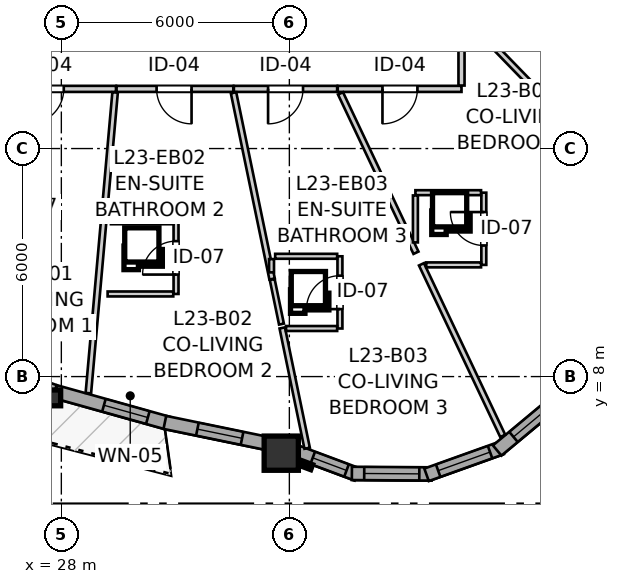
"""IFC4 building model, lengths in metres.
Left out: names, types, materials, properties, quantities, classifications, styles, units other than length and angle.
Written with IfcOpenShell. Run it as: python <this file> out.ifc"""

import sys

from ifc_helpers import new_model, si_unit, direction, frame, frame_2d, origin, origin_2d, place, context, subcontext, project, spatial, rectangle, i_section, extrude, source, transform, mapped, element, fill, save


model = new_model("IFC4")
c1 = context("Model", 3, precision=1e-05, world=origin(), true_north=direction((0.0, 1.0)))
c2 = subcontext(c1, "Body", "Model", "MODEL_VIEW")
j1 = project(units=[si_unit("LENGTHUNIT", "METRE"), si_unit("PLANEANGLEUNIT", "RADIAN")], contexts=[c1])
p1 = place(None, origin())
s1 = spatial("IfcSite", under=j1, at=p1, CompositionType="ELEMENT")
p2 = place(p1, origin())
s2 = spatial("IfcBuilding", under=s1, at=p2, CompositionType="ELEMENT")
p3 = place(p2, frame((0.0, 0.0, 80.0)))
s3 = spatial("IfcBuildingStorey", under=s2, at=p3, CompositionType="ELEMENT", Elevation=80.0)
m1 = source(origin(), c2, "Body", "SweptSolid", [
    extrude(i_section(OverallWidth=0.406, OverallDepth=0.416, WebThickness=0.027, FlangeThickness=0.044, FilletRadius=0.015, at=origin_2d()), origin(), (0.0, 0.0, 1.0), 2.935),
])
p4 = place(p3, frame((27.779, 7.439, 0.0), z_axis=(0.0, 0.0, 1.0), x_axis=(1.0, 0.0, 0.0)))
e1 = element("IfcColumn", 1, at=p4, inside=s3, PredefinedType="PILASTER", context=c2, shape_type="MappedRepresentation", body=[
    mapped(m1, transform((0.0, 0.0, 0.0), x_axis=(1.0, 0.0, 0.0), y_axis=(0.0, 1.0, 0.0), z_axis=(0.0, 0.0, 1.0), scale=1.0)),
])
m2 = source(origin(), c2, "Body", "SweptSolid", [
    extrude(rectangle(XDim=0.9, YDim=0.9, at=origin_2d()), origin(), (0.0, 0.0, 1.0), 2.935),
])
p5 = place(p3, frame((33.787, 5.985, 0.0), z_axis=(0.0, 0.0, 1.0), x_axis=(1.0, 0.0, 0.0)))
e2 = element("IfcColumn", 2, at=p5, inside=s3, PredefinedType="COLUMN", context=c2, shape_type="MappedRepresentation", body=[
    mapped(m2, transform((0.0, 0.0, 0.0), x_axis=(1.0, 0.0, 0.0), y_axis=(0.0, 1.0, 0.0), z_axis=(0.0, 0.0, 1.0), scale=1.0)),
])
p6 = place(p3, frame((24.969, 8.635, 0.0), z_axis=(0.0, 0.0, 1.0), x_axis=(0.941099972293, -0.338128440315, 0.0)))
e3 = element("IfcWall", 3, at=p6, inside=s3, PredefinedType="SOLIDWALL", context=c2, shape_type="SweptSolid", body=[
    extrude(rectangle(XDim=3.028, YDim=0.35, at=frame_2d((1.514, 0.0))), origin(), (0.0, 0.0, 1.0), 2.465),
])
p7 = place(p6, frame((0.774, 0.0, 0.82)))
e4 = element("IfcOpeningElement", 4, at=p7, cuts=e3, PredefinedType="OPENING", context=c2, shape_type="SweptSolid", body=[
    extrude(rectangle(XDim=1.5, YDim=1.45, at=frame_2d((0.75, 0.725))), frame((0.0, 0.185, 0.0), z_axis=(0.0, -1.0, 0.0), x_axis=(1.0, 0.0, 0.0)), (0.0, 0.0, 1.0), 0.37),
])
p8 = place(p3, frame((27.845, 7.603, 0.0), z_axis=(0.0, 0.0, 1.0), x_axis=(0.963041412051, -0.269353371382, 0.0)))
e5 = element("IfcWall", 5, at=p8, inside=s3, PredefinedType="SOLIDWALL", context=c2, shape_type="SweptSolid", body=[
    extrude(rectangle(XDim=3.078, YDim=0.35, at=frame_2d((1.539, 0.0))), origin(), (0.0, 0.0, 1.0), 2.465),
])
p9 = place(p8, frame((1.324, 0.0, 0.82)))
e6 = element("IfcOpeningElement", 6, at=p9, cuts=e5, PredefinedType="OPENING", context=c2, shape_type="SweptSolid", body=[
    extrude(rectangle(XDim=1.2, YDim=1.45, at=frame_2d((0.6, 0.725))), frame((0.0, 0.185, 0.0), z_axis=(0.0, -1.0, 0.0), x_axis=(1.0, 0.0, 0.0)), (0.0, 0.0, 1.0), 0.37),
])
p10 = place(p3, frame((30.724, 6.794, 0.0), z_axis=(0.0, 0.0, 1.0), x_axis=(0.979439663571, -0.201737317878, 0.0)))
e7 = element("IfcWall", 7, at=p10, inside=s3, PredefinedType="SOLIDWALL", context=c2, shape_type="SweptSolid", body=[
    extrude(rectangle(XDim=2.938, YDim=0.35, at=frame_2d((1.469, 0.0))), origin(), (0.0, 0.0, 1.0), 2.465),
])
p11 = place(p10, frame((0.874, 0.0, 0.82)))
e8 = element("IfcOpeningElement", 8, at=p11, cuts=e7, PredefinedType="OPENING", context=c2, shape_type="SweptSolid", body=[
    extrude(rectangle(XDim=1.2, YDim=1.45, at=frame_2d((0.6, 0.725))), frame((0.0, 0.185, 0.0), z_axis=(0.0, -1.0, 0.0), x_axis=(1.0, 0.0, 0.0)), (0.0, 0.0, 1.0), 0.37),
])
p12 = place(p3, frame((34.059, 6.07, 0.0), z_axis=(0.0, 0.0, 1.0), x_axis=(0.936803747811, -0.349855310219, 0.0)))
e9 = element("IfcWall", 9, at=p12, inside=s3, PredefinedType="SOLIDWALL", context=c2, shape_type="SweptSolid", body=[
    extrude(rectangle(XDim=1.836, YDim=0.35, at=frame_2d((0.918, 0.0))), origin(), (0.0, 0.0, 1.0), 2.465),
])
p13 = place(p12, frame((0.593, 0.0, 0.82)))
e10 = element("IfcOpeningElement", 10, at=p13, cuts=e9, PredefinedType="OPENING", context=c2, shape_type="SweptSolid", body=[
    extrude(rectangle(XDim=0.95, YDim=1.35, at=frame_2d((0.475, 0.675))), frame((0.0, 0.185, 0.0), z_axis=(0.0, -1.0, 0.0), x_axis=(1.0, 0.0, 0.0)), (0.0, 0.0, 1.0), 0.37),
])
p14 = place(p3, frame((35.646, 5.452, 0.0), z_axis=(0.0, 0.0, 1.0), x_axis=(0.999976451414, -0.006862697526, 0.0)))
e11 = element("IfcWall", 11, at=p14, inside=s3, PredefinedType="SOLIDWALL", context=c2, shape_type="SweptSolid", body=[
    extrude(rectangle(XDim=2.099, YDim=0.35, at=frame_2d((1.049, 0.0))), origin(), (0.0, 0.0, 1.0), 2.465),
])
p15 = place(p14, frame((0.324, 0.0, 0.82)))
e12 = element("IfcOpeningElement", 12, at=p15, cuts=e11, PredefinedType="OPENING", context=c2, shape_type="SweptSolid", body=[
    extrude(rectangle(XDim=1.45, YDim=1.25, at=frame_2d((0.725, 0.625))), frame((0.0, 0.185, 0.0), z_axis=(0.0, -1.0, 0.0), x_axis=(1.0, 0.0, 0.0)), (0.0, 0.0, 1.0), 0.37),
])
p16 = place(p3, frame((37.61, 5.415, 0.0), z_axis=(0.0, 0.0, 1.0), x_axis=(0.941473186867, 0.33708787936, 0.0)))
e13 = element("IfcWall", 13, at=p16, inside=s3, PredefinedType="SOLIDWALL", context=c2, shape_type="SweptSolid", body=[
    extrude(rectangle(XDim=2.099, YDim=0.35, at=frame_2d((1.049, 0.0))), origin(), (0.0, 0.0, 1.0), 2.465),
])
p17 = place(p16, frame((0.324, 0.0, 0.82)))
e14 = element("IfcOpeningElement", 14, at=p17, cuts=e13, PredefinedType="OPENING", context=c2, shape_type="SweptSolid", body=[
    extrude(rectangle(XDim=1.45, YDim=1.25, at=frame_2d((0.725, 0.625))), frame((0.0, 0.185, 0.0), z_axis=(0.0, -1.0, 0.0), x_axis=(1.0, 0.0, 0.0)), (0.0, 0.0, 1.0), 0.37),
])
p18 = place(p3, frame((39.469, 6.055, 0.0), z_axis=(0.0, 0.0, 1.0), x_axis=(0.768497696041, 0.639852554249, 0.0)))
e15 = element("IfcWall", 15, at=p18, inside=s3, PredefinedType="SOLIDWALL", context=c2, shape_type="SweptSolid", body=[
    extrude(rectangle(XDim=2.099, YDim=0.35, at=frame_2d((1.049, 0.0))), origin(), (0.0, 0.0, 1.0), 2.465),
])
p19 = place(p18, frame((0.559, 0.0, 0.82)))
e16 = element("IfcOpeningElement", 16, at=p19, cuts=e15, PredefinedType="OPENING", context=c2, shape_type="SweptSolid", body=[
    extrude(rectangle(XDim=1.25, YDim=1.35, at=frame_2d((0.625, 0.675))), frame((0.0, 0.185, 0.0), z_axis=(0.0, -1.0, 0.0), x_axis=(1.0, 0.0, 0.0)), (0.0, 0.0, 1.0), 0.37),
])
p20 = place(p3, frame((29.438, 15.57, 0.0), z_axis=(0.0, 0.0, 1.0), x_axis=(-1.0, 0.0, 0.0)))
e17 = element("IfcWall", 17, at=p20, inside=s3, PredefinedType="PARTITIONING", context=c2, shape_type="SweptSolid", body=[
    extrude(rectangle(XDim=3.67, YDim=0.16, at=frame_2d((1.835, 0.0))), origin(), (0.0, 0.0, 1.0), 2.935),
])
p21 = place(p20, frame((1.374, 0.0, 0.0)))
e18 = element("IfcOpeningElement", 18, at=p21, cuts=e17, PredefinedType="OPENING", context=c2, shape_type="SweptSolid", body=[
    extrude(rectangle(XDim=0.92, YDim=2.1, at=frame_2d((0.46, 1.05))), frame((0.0, 0.09, 0.0), z_axis=(0.0, -1.0, 0.0), x_axis=(1.0, 0.0, 0.0)), (0.0, 0.0, 1.0), 0.18),
])
p22 = place(p3, frame((38.53, 15.57, 0.0), z_axis=(0.0, 0.0, 1.0), x_axis=(-1.0, 0.0, 0.0)))
e19 = element("IfcWall", 19, at=p22, inside=s3, PredefinedType="PARTITIONING", context=c2, shape_type="SweptSolid", body=[
    extrude(rectangle(XDim=3.257, YDim=0.16, at=frame_2d((1.628, 0.0))), origin(), (0.0, 0.0, 1.0), 2.935),
])
p23 = place(p22, frame((1.16, 0.0, 0.0)))
e20 = element("IfcOpeningElement", 20, at=p23, cuts=e19, PredefinedType="OPENING", context=c2, shape_type="SweptSolid", body=[
    extrude(rectangle(XDim=0.92, YDim=2.1, at=frame_2d((0.46, 1.05))), frame((0.0, 0.09, 0.0), z_axis=(0.0, -1.0, 0.0), x_axis=(1.0, 0.0, 0.0)), (0.0, 0.0, 1.0), 0.18),
])
p24 = place(p3, frame((32.525, 15.57, 0.0), z_axis=(0.0, 0.0, 1.0), x_axis=(-1.0, 0.0, 0.0)))
e21 = element("IfcWall", 21, at=p24, inside=s3, PredefinedType="PARTITIONING", context=c2, shape_type="SweptSolid", body=[
    extrude(rectangle(XDim=3.072, YDim=0.16, at=frame_2d((1.536, 0.0))), origin(), (0.0, 0.0, 1.0), 2.935),
])
p25 = place(p24, frame((1.098, 0.0, 0.0)))
e22 = element("IfcOpeningElement", 22, at=p25, cuts=e21, PredefinedType="OPENING", context=c2, shape_type="SweptSolid", body=[
    extrude(rectangle(XDim=0.92, YDim=2.1, at=frame_2d((0.46, 1.05))), frame((0.0, 0.09, 0.0), z_axis=(0.0, -1.0, 0.0), x_axis=(1.0, 0.0, 0.0)), (0.0, 0.0, 1.0), 0.18),
])
p26 = place(p3, frame((35.258, 15.57, 0.0), z_axis=(0.0, 0.0, 1.0), x_axis=(-1.0, 0.0, 0.0)))
e23 = element("IfcWall", 23, at=p26, inside=s3, PredefinedType="PARTITIONING", context=c2, shape_type="SweptSolid", body=[
    extrude(rectangle(XDim=2.718, YDim=0.16, at=frame_2d((1.359, 0.0))), origin(), (0.0, 0.0, 1.0), 2.935),
])
p27 = place(p26, frame((0.898, 0.0, 0.0)))
e24 = element("IfcOpeningElement", 24, at=p27, cuts=e23, PredefinedType="OPENING", context=c2, shape_type="SweptSolid", body=[
    extrude(rectangle(XDim=0.92, YDim=2.1, at=frame_2d((0.46, 1.05))), frame((0.0, 0.09, 0.0), z_axis=(0.0, -1.0, 0.0), x_axis=(1.0, 0.0, 0.0)), (0.0, 0.0, 1.0), 0.18),
])
p28 = place(p3, frame((31.018, 10.174, 0.0), z_axis=(0.0, 0.0, 1.0), x_axis=(0.0, 1.0, 0.0)))
e25 = element("IfcWall", 25, at=p28, inside=s3, PredefinedType="PARTITIONING", context=c2, shape_type="SweptSolid", body=[
    extrude(rectangle(XDim=1.9, YDim=0.13, at=frame_2d((0.95, 0.0))), origin(), (0.0, 0.0, 1.0), 2.935),
])
p29 = place(p28, frame((0.51, 0.0, 0.0)))
e26 = element("IfcOpeningElement", 26, at=p29, cuts=e25, PredefinedType="OPENING", context=c2, shape_type="SweptSolid", body=[
    extrude(rectangle(XDim=0.88, YDim=2.05, at=frame_2d((0.44, 1.025))), frame((0.0, 0.075, 0.0), z_axis=(0.0, -1.0, 0.0), x_axis=(1.0, 0.0, 0.0)), (0.0, 0.0, 1.0), 0.15),
])
p30 = place(p3, frame((39.117, 10.939, 0.0), z_axis=(0.0, 0.0, 1.0), x_axis=(0.0, 1.0, 0.0)))
e27 = element("IfcWall", 27, at=p30, inside=s3, PredefinedType="PARTITIONING", context=c2, shape_type="SweptSolid", body=[
    extrude(rectangle(XDim=1.9, YDim=0.13, at=frame_2d((0.95, 0.0))), origin(), (0.0, 0.0, 1.0), 2.935),
])
p31 = place(p30, frame((0.51, 0.0, 0.0)))
e28 = element("IfcOpeningElement", 28, at=p31, cuts=e27, PredefinedType="OPENING", context=c2, shape_type="SweptSolid", body=[
    extrude(rectangle(XDim=0.88, YDim=2.05, at=frame_2d((0.44, 1.025))), frame((0.0, 0.075, 0.0), z_axis=(0.0, -1.0, 0.0), x_axis=(1.0, 0.0, 0.0)), (0.0, 0.0, 1.0), 0.15),
])
p32 = place(p3, frame((35.331, 9.265, 0.0), z_axis=(0.0, 0.0, 1.0), x_axis=(0.0, 1.0, 0.0)))
e29 = element("IfcWall", 29, at=p32, inside=s3, PredefinedType="PARTITIONING", context=c2, shape_type="SweptSolid", body=[
    extrude(rectangle(XDim=1.9, YDim=0.13, at=frame_2d((0.95, 0.0))), origin(), (0.0, 0.0, 1.0), 2.935),
])
p33 = place(p32, frame((0.51, 0.0, 0.0)))
e30 = element("IfcOpeningElement", 30, at=p33, cuts=e29, PredefinedType="OPENING", context=c2, shape_type="SweptSolid", body=[
    extrude(rectangle(XDim=0.88, YDim=2.05, at=frame_2d((0.44, 1.025))), frame((0.0, 0.075, 0.0), z_axis=(0.0, -1.0, 0.0), x_axis=(1.0, 0.0, 0.0)), (0.0, 0.0, 1.0), 0.15),
])
p34 = place(p3, frame((28.711, 7.564, 0.0), z_axis=(0.0, 0.0, 1.0), x_axis=(0.088615013812, 0.996065951294, 0.0)))
e31 = element("IfcWall", 31, at=p34, inside=s3, PredefinedType="PARTITIONING", context=c2, shape_type="SweptSolid", body=[
    extrude(rectangle(XDim=7.943, YDim=0.145, at=frame_2d((3.971, 0.0))), origin(), (0.0, 0.0, 1.0), 2.935),
])
p35 = place(p3, frame((38.667, 17.429, 0.0), z_axis=(0.0, 0.0, 1.0), x_axis=(0.696417222112, -0.717637131666, 0.0)))
e32 = element("IfcWall", 32, at=p35, inside=s3, PredefinedType="PARTITIONING", context=c2, shape_type="SweptSolid", body=[
    extrude(rectangle(XDim=6.04, YDim=0.145, at=frame_2d((3.02, 0.0))), origin(), (0.0, 0.0, 1.0), 2.935),
])
p36 = place(p3, frame((32.531, 15.468, 0.0), z_axis=(0.0, 0.0, 1.0), x_axis=(0.202792769077, -0.979221677053, 0.0)))
e33 = element("IfcWall", 33, at=p36, inside=s3, PredefinedType="PARTITIONING", context=c2, shape_type="SweptSolid", body=[
    extrude(rectangle(XDim=5.003, YDim=0.145, at=frame_2d((2.502, 0.0))), origin(), (0.0, 0.0, 1.0), 2.935),
])
p37 = place(p3, frame((37.476, 10.954, 0.0), z_axis=(0.0, 0.0, 1.0), x_axis=(0.428094746621, -0.903733859007, 0.0)))
e34 = element("IfcWall", 34, at=p37, inside=s3, PredefinedType="PARTITIONING", context=c2, shape_type="SweptSolid", body=[
    extrude(rectangle(XDim=4.996, YDim=0.145, at=frame_2d((2.498, 0.0))), origin(), (0.0, 0.0, 1.0), 2.935),
])
p38 = place(p3, frame((35.346, 15.452, 0.0), z_axis=(0.0, 0.0, 1.0), x_axis=(0.428023015228, -0.903767834366, 0.0)))
e35 = element("IfcWall", 35, at=p38, inside=s3, PredefinedType="PARTITIONING", context=c2, shape_type="SweptSolid", body=[
    extrude(rectangle(XDim=4.64, YDim=0.145, at=frame_2d((2.32, 0.0))), origin(), (0.0, 0.0, 1.0), 2.935),
])
p39 = place(p3, frame((33.813, 9.28, 0.0), z_axis=(0.0, 0.0, 1.0), x_axis=(0.202648062782, -0.979251633979, 0.0)))
e36 = element("IfcWall", 36, at=p39, inside=s3, PredefinedType="PARTITIONING", context=c2, shape_type="SweptSolid", body=[
    extrude(rectangle(XDim=3.232, YDim=0.145, at=frame_2d((1.616, 0.0))), origin(), (0.0, 0.0, 1.0), 2.935),
])
p40 = place(p3, frame((38.53, 15.658, 0.0), z_axis=(0.0, 0.0, 1.0), x_axis=(0.0, 1.0, 0.0)))
e37 = element("IfcWall", 37, at=p40, inside=s3, PredefinedType="PARTITIONING", context=c2, shape_type="SweptSolid", body=[
    extrude(rectangle(XDim=1.682, YDim=0.16, at=frame_2d((0.841, 0.0))), origin(), (0.0, 0.0, 1.0), 2.935),
])
p41 = place(p3, frame((33.626, 11.165, 0.0), z_axis=(0.0, 0.0, 1.0), x_axis=(1.0, 0.0, 0.0)))
e38 = element("IfcWall", 38, at=p41, inside=s3, PredefinedType="PARTITIONING", context=c2, shape_type="SweptSolid", body=[
    extrude(rectangle(XDim=1.632, YDim=0.13, at=frame_2d((0.816, 0.0))), origin(), (0.0, 0.0, 1.0), 2.935),
])
p42 = place(p3, frame((29.305, 12.074, 0.0), z_axis=(0.0, 0.0, 1.0), x_axis=(1.0, 0.0, 0.0)))
e39 = element("IfcWall", 39, at=p42, inside=s3, PredefinedType="PARTITIONING", context=c2, shape_type="SweptSolid", body=[
    extrude(rectangle(XDim=1.64, YDim=0.13, at=frame_2d((0.82, 0.0))), origin(), (0.0, 0.0, 1.0), 2.935),
])
p43 = place(p3, frame((29.218, 10.174, 0.0), z_axis=(0.0, 0.0, 1.0), x_axis=(1.0, 0.0, 0.0)))
e40 = element("IfcWall", 40, at=p43, inside=s3, PredefinedType="PARTITIONING", context=c2, shape_type="SweptSolid", body=[
    extrude(rectangle(XDim=1.727, YDim=0.13, at=frame_2d((0.864, 0.0))), origin(), (0.0, 0.0, 1.0), 2.543),
])
p44 = place(p3, frame((37.317, 12.839, 0.0), z_axis=(0.0, 0.0, 1.0), x_axis=(1.0, 0.0, 0.0)))
e41 = element("IfcWall", 41, at=p44, inside=s3, PredefinedType="PARTITIONING", context=c2, shape_type="SweptSolid", body=[
    extrude(rectangle(XDim=1.727, YDim=0.13, at=frame_2d((0.864, 0.0))), origin(), (0.0, 0.0, 1.0), 2.935),
])
p45 = place(p3, frame((37.602, 10.939, 0.0), z_axis=(0.0, 0.0, 1.0), x_axis=(1.0, 0.0, 0.0)))
e42 = element("IfcWall", 42, at=p45, inside=s3, PredefinedType="PARTITIONING", context=c2, shape_type="SweptSolid", body=[
    extrude(rectangle(XDim=1.442, YDim=0.13, at=frame_2d((0.721, 0.0))), origin(), (0.0, 0.0, 1.0), 2.935),
])
p46 = place(p3, frame((37.317, 11.53, 0.0), z_axis=(0.0, 0.0, 1.0), x_axis=(0.0, 1.0, 0.0)))
e43 = element("IfcWall", 43, at=p46, inside=s3, PredefinedType="PARTITIONING", context=c2, shape_type="SweptSolid", body=[
    extrude(rectangle(XDim=1.236, YDim=0.13, at=frame_2d((0.618, 0.0))), origin(), (0.0, 0.0, 1.0), 2.935),
])
p47 = place(p3, frame((33.912, 9.265, 0.0), z_axis=(0.0, 0.0, 1.0), x_axis=(1.0, 0.0, 0.0)))
e44 = element("IfcWall", 44, at=p47, inside=s3, PredefinedType="PARTITIONING", context=c2, shape_type="SweptSolid", body=[
    extrude(rectangle(XDim=1.346, YDim=0.13, at=frame_2d((0.673, 0.0))), origin(), (0.0, 0.0, 1.0), 2.935),
])
p48 = place(p3, frame((33.549, 10.553, 0.0), z_axis=(0.0, 0.0, 1.0), x_axis=(0.202855035592, -0.97920877985, 0.0)))
e45 = element("IfcWall", 45, at=p48, inside=s3, PredefinedType="PARTITIONING", context=c2, shape_type="SweptSolid", body=[
    extrude(rectangle(XDim=1.198, YDim=0.13, at=frame_2d((0.599, 0.0))), origin(), (0.0, 0.0, 1.0), 2.935),
])
p49 = place(p3, frame((33.531, 10.742, 0.0), z_axis=(0.0, 0.0, 1.0), x_axis=(0.0, 1.0, 0.0)))
e46 = element("IfcWall", 46, at=p49, inside=s3, PredefinedType="PARTITIONING", context=c2, shape_type="SweptSolid", body=[
    extrude(rectangle(XDim=0.35, YDim=0.13, at=frame_2d((0.175, 0.0))), origin(), (0.0, 0.0, 1.0), 2.935),
])
m3 = source(origin(), c2, "Body", "SweptSolid", [
    extrude(rectangle(XDim=1.2, YDim=1.45, at=frame_2d((0.6, 0.725))), frame((0.0, 0.03, 0.0), z_axis=(0.0, -1.0, 0.0), x_axis=(1.0, 0.0, 0.0)), (0.0, 0.0, 1.0), 0.06),
])
p50 = place(p9, origin())
e47 = element("IfcWindow", 47, at=p50, inside=s3, PartitioningType="SINGLE_PANEL", PredefinedType="WINDOW", context=c2, shape_type="MappedRepresentation", body=[
    mapped(m3, transform((0.0, 0.0, 0.0), x_axis=(1.0, 0.0, 0.0), y_axis=(0.0, 1.0, 0.0), z_axis=(0.0, 0.0, 1.0), scale=1.0)),
])
fill(e6, e47)
p51 = place(p11, origin())
e48 = element("IfcWindow", 48, at=p51, inside=s3, PartitioningType="SINGLE_PANEL", PredefinedType="WINDOW", context=c2, shape_type="MappedRepresentation", body=[
    mapped(m3, transform((0.0, 0.0, 0.0), x_axis=(1.0, 0.0, 0.0), y_axis=(0.0, 1.0, 0.0), z_axis=(0.0, 0.0, 1.0), scale=1.0)),
])
fill(e8, e48)
m4 = source(origin(), c2, "Body", "SweptSolid", [
    extrude(rectangle(XDim=0.95, YDim=1.35, at=frame_2d((0.475, 0.675))), frame((0.0, 0.03, 0.0), z_axis=(0.0, -1.0, 0.0), x_axis=(1.0, 0.0, 0.0)), (0.0, 0.0, 1.0), 0.06),
])
p52 = place(p13, origin())
e49 = element("IfcWindow", 49, at=p52, inside=s3, PartitioningType="SINGLE_PANEL", PredefinedType="WINDOW", context=c2, shape_type="MappedRepresentation", body=[
    mapped(m4, transform((0.0, 0.0, 0.0), x_axis=(1.0, 0.0, 0.0), y_axis=(0.0, 1.0, 0.0), z_axis=(0.0, 0.0, 1.0), scale=1.0)),
])
fill(e10, e49)
m5 = source(origin(), c2, "Body", "SweptSolid", [
    extrude(rectangle(XDim=1.45, YDim=1.25, at=frame_2d((0.725, 0.625))), frame((0.0, 0.03, 0.0), z_axis=(0.0, -1.0, 0.0), x_axis=(1.0, 0.0, 0.0)), (0.0, 0.0, 1.0), 0.06),
])
p53 = place(p15, origin())
e50 = element("IfcWindow", 50, at=p53, inside=s3, PartitioningType="SINGLE_PANEL", PredefinedType="WINDOW", context=c2, shape_type="MappedRepresentation", body=[
    mapped(m5, transform((0.0, 0.0, 0.0), x_axis=(1.0, 0.0, 0.0), y_axis=(0.0, 1.0, 0.0), z_axis=(0.0, 0.0, 1.0), scale=1.0)),
])
fill(e12, e50)
p54 = place(p17, origin())
e51 = element("IfcWindow", 51, at=p54, inside=s3, PartitioningType="SINGLE_PANEL", PredefinedType="WINDOW", context=c2, shape_type="MappedRepresentation", body=[
    mapped(m5, transform((0.0, 0.0, 0.0), x_axis=(1.0, 0.0, 0.0), y_axis=(0.0, 1.0, 0.0), z_axis=(0.0, 0.0, 1.0), scale=1.0)),
])
fill(e14, e51)
m6 = source(origin(), c2, "Body", "SweptSolid", [
    extrude(rectangle(XDim=1.25, YDim=1.35, at=frame_2d((0.625, 0.675))), frame((0.0, 0.03, 0.0), z_axis=(0.0, -1.0, 0.0), x_axis=(1.0, 0.0, 0.0)), (0.0, 0.0, 1.0), 0.06),
])
p55 = place(p19, origin())
e52 = element("IfcWindow", 52, at=p55, inside=s3, PartitioningType="SINGLE_PANEL", PredefinedType="WINDOW", context=c2, shape_type="MappedRepresentation", body=[
    mapped(m6, transform((0.0, 0.0, 0.0), x_axis=(1.0, 0.0, 0.0), y_axis=(0.0, 1.0, 0.0), z_axis=(0.0, 0.0, 1.0), scale=1.0)),
])
fill(e16, e52)
m7 = source(origin(), c2, "Body", "SweptSolid", [
    extrude(rectangle(XDim=0.92, YDim=2.1, at=frame_2d((0.46, 1.05))), frame((0.0, 0.025, 0.0), z_axis=(0.0, -1.0, 0.0), x_axis=(1.0, 0.0, 0.0)), (0.0, 0.0, 1.0), 0.05),
])
p56 = place(p21, origin())
e53 = element("IfcDoor", 53, at=p56, inside=s3, OperationType="SINGLE_SWING_RIGHT", PredefinedType="DOOR", context=c2, shape_type="MappedRepresentation", body=[
    mapped(m7, transform((0.0, 0.0, 0.0), x_axis=(1.0, 0.0, 0.0), y_axis=(0.0, 1.0, 0.0), z_axis=(0.0, 0.0, 1.0), scale=1.0)),
])
fill(e18, e53)
p57 = place(p23, origin())
e54 = element("IfcDoor", 54, at=p57, inside=s3, OperationType="SINGLE_SWING_RIGHT", PredefinedType="DOOR", context=c2, shape_type="MappedRepresentation", body=[
    mapped(m7, transform((0.0, 0.0, 0.0), x_axis=(1.0, 0.0, 0.0), y_axis=(0.0, 1.0, 0.0), z_axis=(0.0, 0.0, 1.0), scale=1.0)),
])
fill(e20, e54)
p58 = place(p25, origin())
e55 = element("IfcDoor", 55, at=p58, inside=s3, OperationType="SINGLE_SWING_LEFT", PredefinedType="DOOR", context=c2, shape_type="MappedRepresentation", body=[
    mapped(m7, transform((0.0, 0.0, 0.0), x_axis=(1.0, 0.0, 0.0), y_axis=(0.0, 1.0, 0.0), z_axis=(0.0, 0.0, 1.0), scale=1.0)),
])
fill(e22, e55)
p59 = place(p27, origin())
e56 = element("IfcDoor", 56, at=p59, inside=s3, OperationType="SINGLE_SWING_RIGHT", PredefinedType="DOOR", context=c2, shape_type="MappedRepresentation", body=[
    mapped(m7, transform((0.0, 0.0, 0.0), x_axis=(1.0, 0.0, 0.0), y_axis=(0.0, 1.0, 0.0), z_axis=(0.0, 0.0, 1.0), scale=1.0)),
])
fill(e24, e56)
m8 = source(origin(), c2, "Body", "SweptSolid", [
    extrude(rectangle(XDim=0.88, YDim=2.05, at=frame_2d((0.44, 1.025))), frame((0.0, 0.025, 0.0), z_axis=(0.0, -1.0, 0.0), x_axis=(1.0, 0.0, 0.0)), (0.0, 0.0, 1.0), 0.05),
])
p60 = place(p29, origin())
e57 = element("IfcDoor", 57, at=p60, inside=s3, OperationType="SINGLE_SWING_LEFT", PredefinedType="DOOR", context=c2, shape_type="MappedRepresentation", body=[
    mapped(m8, transform((0.0, 0.0, 0.0), x_axis=(1.0, 0.0, 0.0), y_axis=(0.0, 1.0, 0.0), z_axis=(0.0, 0.0, 1.0), scale=1.0)),
])
fill(e26, e57)
p61 = place(p31, origin())
e58 = element("IfcDoor", 58, at=p61, inside=s3, OperationType="SINGLE_SWING_RIGHT", PredefinedType="DOOR", context=c2, shape_type="MappedRepresentation", body=[
    mapped(m8, transform((0.0, 0.0, 0.0), x_axis=(1.0, 0.0, 0.0), y_axis=(0.0, 1.0, 0.0), z_axis=(0.0, 0.0, 1.0), scale=1.0)),
])
fill(e28, e58)
p62 = place(p33, origin())
e59 = element("IfcDoor", 59, at=p62, inside=s3, OperationType="SINGLE_SWING_LEFT", PredefinedType="DOOR", context=c2, shape_type="MappedRepresentation", body=[
    mapped(m8, transform((0.0, 0.0, 0.0), x_axis=(1.0, 0.0, 0.0), y_axis=(0.0, 1.0, 0.0), z_axis=(0.0, 0.0, 1.0), scale=1.0)),
])
fill(e30, e59)
save(model, sys.argv[1])
